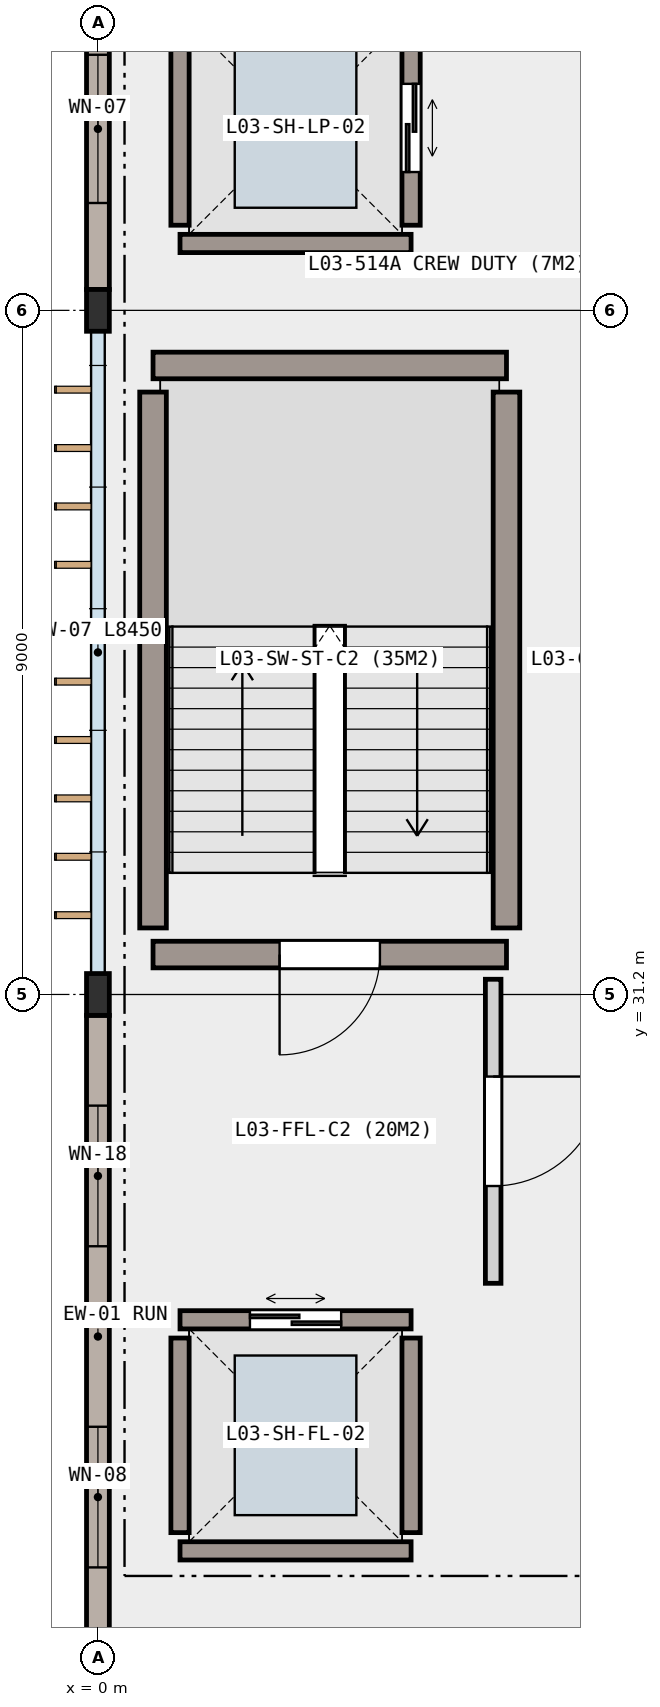
"""IFC4 building model, lengths in metres.
Left out: names, types, materials, properties, quantities, classifications, styles, units other than length and angle.
Written with IfcOpenShell. Run it as: python <this file> out.ifc"""

import sys

from ifc_helpers import new_model, si_unit, direction, frame, frame_2d, origin, origin_2d, place, context, subcontext, project, spatial, rectangle, i_section, extrude, element, fill, save


model = new_model("IFC4")
c1 = context("Model", 3, precision=1e-05, world=origin(), true_north=direction((0.0, 1.0)))
c2 = subcontext(c1, "Body", "Model", "MODEL_VIEW")
j1 = project(units=[si_unit("LENGTHUNIT", "METRE"), si_unit("PLANEANGLEUNIT", "RADIAN")], contexts=[c1])
p1 = place(None, origin())
s1 = spatial("IfcSite", under=j1, at=p1, CompositionType="ELEMENT")
p2 = place(p1, origin())
s2 = spatial("IfcBuilding", under=s1, at=p2, CompositionType="ELEMENT")
p3 = place(p2, frame((0.0, 0.0, 14.4)))
s3 = spatial("IfcBuildingStorey", under=s2, at=p3, CompositionType="ELEMENT", Elevation=14.4)
for number, where, z_axis, x_axis in (
    (1, (0.0, 31.2, 0.0), (0.0, 0.0, 1.0), (1.0, 0.0, 0.0)),
    (2, (0.0, 40.2, 0.0), (0.0, 0.0, 1.0), (1.0, 0.0, 0.0)),
):
    element("IfcColumn", number, at=place(p3, frame(where, z_axis=z_axis, x_axis=x_axis)), inside=s3, PredefinedType="COLUMN", context=c2, shape_type="SweptSolid", body=[
        extrude(i_section(OverallWidth=0.3, OverallDepth=0.55, WebThickness=0.015, FlangeThickness=0.029, FilletRadius=0.027, at=origin_2d()), origin(), (0.0, 0.0, 1.0), 4.2),
    ])
p4 = place(p3, frame((0.0, 22.475, 0.0), z_axis=(0.0, 0.0, 1.0), x_axis=(0.0, 1.0, 0.0)))
e3 = element("IfcWall", 3, at=p4, inside=s3, PredefinedType="SOLIDWALL", context=c2, shape_type="SweptSolid", body=[
    extrude(rectangle(XDim=8.45, YDim=0.3, at=frame_2d((4.225, 0.0))), origin(), (0.0, 0.0, 1.0), 3.53),
])
p5 = place(p4, frame((1.188, 0.0, 0.85)))
e4 = element("IfcOpeningElement", 4, at=p5, cuts=e3, PredefinedType="OPENING", context=c2, shape_type="SweptSolid", body=[
    extrude(rectangle(XDim=1.85, YDim=1.85, at=frame_2d((0.925, 0.925))), frame((0.0, 0.16, 0.0), z_axis=(0.0, -1.0, 0.0), x_axis=(1.0, 0.0, 0.0)), (0.0, 0.0, 1.0), 0.32),
])
p6 = place(p4, frame((5.413, 0.0, 0.85)))
e5 = element("IfcOpeningElement", 5, at=p6, cuts=e3, PredefinedType="OPENING", context=c2, shape_type="SweptSolid", body=[
    extrude(rectangle(XDim=1.85, YDim=2.15, at=frame_2d((0.925, 1.075))), frame((0.0, 0.16, 0.0), z_axis=(0.0, -1.0, 0.0), x_axis=(1.0, 0.0, 0.0)), (0.0, 0.0, 1.0), 0.32),
])
p7 = place(p3, frame((0.0, 40.475, 0.0), z_axis=(0.0, 0.0, 1.0), x_axis=(0.0, 1.0, 0.0)))
e6 = element("IfcWall", 6, at=p7, inside=s3, PredefinedType="SOLIDWALL", context=c2, shape_type="SweptSolid", body=[
    extrude(rectangle(XDim=8.45, YDim=0.3, at=frame_2d((4.225, 0.0))), origin(), (0.0, 0.0, 1.0), 3.53),
])
p8 = place(p7, frame((1.137, 0.0, 0.85)))
e7 = element("IfcOpeningElement", 7, at=p8, cuts=e6, PredefinedType="OPENING", context=c2, shape_type="SweptSolid", body=[
    extrude(rectangle(XDim=1.95, YDim=1.5, at=frame_2d((0.975, 0.75))), frame((0.0, 0.16, 0.0), z_axis=(0.0, -1.0, 0.0), x_axis=(1.0, 0.0, 0.0)), (0.0, 0.0, 1.0), 0.32),
])
p9 = place(p7, frame((5.363, 0.0, 0.85)))
e8 = element("IfcOpeningElement", 8, at=p9, cuts=e6, PredefinedType="OPENING", context=c2, shape_type="SweptSolid", body=[
    extrude(rectangle(XDim=1.95, YDim=1.85, at=frame_2d((0.975, 0.925))), frame((0.0, 0.16, 0.0), z_axis=(0.0, -1.0, 0.0), x_axis=(1.0, 0.0, 0.0)), (0.0, 0.0, 1.0), 0.32),
])
p10 = place(p3, frame((4.12, 23.88, 0.0), z_axis=(0.0, 0.0, 1.0), x_axis=(-1.0, 0.0, 0.0)))
e9 = element("IfcWall", 9, at=p10, inside=s3, PredefinedType="SHEAR", context=c2, shape_type="SweptSolid", body=[
    extrude(rectangle(XDim=3.04, YDim=0.24, at=frame_2d((1.52, 0.0))), origin(), (0.0, 0.0, 1.0), 3.96),
])
p11 = place(p3, frame((1.08, 26.92, 0.0), z_axis=(0.0, 0.0, 1.0), x_axis=(1.0, 0.0, 0.0)))
e10 = element("IfcWall", 10, at=p11, inside=s3, PredefinedType="SHEAR", context=c2, shape_type="SweptSolid", body=[
    extrude(rectangle(XDim=3.04, YDim=0.24, at=frame_2d((1.52, 0.0))), origin(), (0.0, 0.0, 1.0), 3.96),
])
p12 = place(p11, frame((0.92, 0.0, 0.0)))
e11 = element("IfcOpeningElement", 11, at=p12, cuts=e10, PredefinedType="OPENING", context=c2, shape_type="SweptSolid", body=[
    extrude(rectangle(XDim=1.2, YDim=2.15, at=frame_2d((0.6, 1.075))), frame((0.0, 0.13, 0.0), z_axis=(0.0, -1.0, 0.0), x_axis=(1.0, 0.0, 0.0)), (0.0, 0.0, 1.0), 0.26),
])
for number, where, z_axis, x_axis in (
    (12, (1.08, 24.12, 0.0), (0.0, 0.0, 1.0), (0.0, 1.0, 0.0)),
    (13, (4.12, 26.68, 0.0), (0.0, 0.0, 1.0), (0.0, -1.0, 0.0)),
):
    element("IfcWall", number, at=place(p3, frame(where, z_axis=z_axis, x_axis=x_axis)), inside=s3, PredefinedType="SHEAR", context=c2, shape_type="SweptSolid", body=[
        extrude(rectangle(XDim=2.56, YDim=0.24, at=frame_2d((1.28, 0.0))), origin(), (0.0, 0.0, 1.0), 3.96),
    ])
p13 = place(p3, frame((4.12, 41.08, 0.0), z_axis=(0.0, 0.0, 1.0), x_axis=(-1.0, 0.0, 0.0)))
e14 = element("IfcWall", 14, at=p13, inside=s3, PredefinedType="SHEAR", context=c2, shape_type="SweptSolid", body=[
    extrude(rectangle(XDim=3.04, YDim=0.24, at=frame_2d((1.52, 0.0))), origin(), (0.0, 0.0, 1.0), 3.96),
])
p14 = place(p3, frame((1.08, 41.32, 0.0), z_axis=(0.0, 0.0, 1.0), x_axis=(0.0, 1.0, 0.0)))
e15 = element("IfcWall", 15, at=p14, inside=s3, PredefinedType="SHEAR", context=c2, shape_type="SweptSolid", body=[
    extrude(rectangle(XDim=2.56, YDim=0.24, at=frame_2d((1.28, 0.0))), origin(), (0.0, 0.0, 1.0), 3.96),
])
p15 = place(p3, frame((4.12, 43.88, 0.0), z_axis=(0.0, 0.0, 1.0), x_axis=(0.0, -1.0, 0.0)))
e16 = element("IfcWall", 16, at=p15, inside=s3, PredefinedType="SHEAR", context=c2, shape_type="SweptSolid", body=[
    extrude(rectangle(XDim=2.56, YDim=0.24, at=frame_2d((1.28, 0.0))), origin(), (0.0, 0.0, 1.0), 3.96),
])
p16 = place(p15, frame((0.7, 0.0, 0.0)))
e17 = element("IfcOpeningElement", 17, at=p16, cuts=e16, PredefinedType="OPENING", context=c2, shape_type="SweptSolid", body=[
    extrude(rectangle(XDim=1.16, YDim=2.15, at=frame_2d((0.58, 1.075))), frame((0.0, 0.13, 0.0), z_axis=(0.0, -1.0, 0.0), x_axis=(1.0, 0.0, 0.0)), (0.0, 0.0, 1.0), 0.26),
])
p17 = place(p3, frame((5.375, 31.725, 0.0), z_axis=(0.0, 0.0, 1.0), x_axis=(-1.0, 0.0, 0.0)))
e18 = element("IfcWall", 18, at=p17, inside=s3, PredefinedType="SHEAR", context=c2, shape_type="SweptSolid", body=[
    extrude(rectangle(XDim=4.65, YDim=0.35, at=frame_2d((2.325, 0.0))), origin(), (0.0, 0.0, 1.0), 3.96),
])
p18 = place(p17, frame((1.665, 0.0, 0.0)))
e19 = element("IfcOpeningElement", 19, at=p18, cuts=e18, PredefinedType="OPENING", context=c2, shape_type="SweptSolid", body=[
    extrude(rectangle(XDim=1.32, YDim=2.15, at=frame_2d((0.66, 1.075))), frame((0.0, 0.185, 0.0), z_axis=(0.0, -1.0, 0.0), x_axis=(1.0, 0.0, 0.0)), (0.0, 0.0, 1.0), 0.37),
])
p19 = place(p3, frame((0.725, 39.475, 0.0), z_axis=(0.0, 0.0, 1.0), x_axis=(1.0, 0.0, 0.0)))
e20 = element("IfcWall", 20, at=p19, inside=s3, PredefinedType="SHEAR", context=c2, shape_type="SweptSolid", body=[
    extrude(rectangle(XDim=4.65, YDim=0.35, at=frame_2d((2.325, 0.0))), origin(), (0.0, 0.0, 1.0), 3.96),
])
for number, where, z_axis, x_axis in (
    (21, (0.725, 32.075, 0.0), (0.0, 0.0, 1.0), (0.0, 1.0, 0.0)),
    (22, (5.375, 39.125, 0.0), (0.0, 0.0, 1.0), (0.0, -1.0, 0.0)),
):
    element("IfcWall", number, at=place(p3, frame(where, z_axis=z_axis, x_axis=x_axis)), inside=s3, PredefinedType="SHEAR", context=c2, shape_type="SweptSolid", body=[
        extrude(rectangle(XDim=7.05, YDim=0.35, at=frame_2d((3.525, 0.0))), origin(), (0.0, 0.0, 1.0), 3.96),
    ])
p20 = place(p3, frame((5.2, 31.4, 0.0), z_axis=(0.0, 0.0, 1.0), x_axis=(0.0, -1.0, 0.0)))
e23 = element("IfcWall", 23, at=p20, inside=s3, PredefinedType="PARTITIONING", context=c2, shape_type="SweptSolid", body=[
    extrude(rectangle(XDim=4.0, YDim=0.205, at=frame_2d((2.0, 0.0))), origin(), (0.0, 0.0, 1.0), 3.96),
])
p21 = place(p20, frame((1.28, 0.0, 0.0)))
e24 = element("IfcOpeningElement", 24, at=p21, cuts=e23, PredefinedType="OPENING", context=c2, shape_type="SweptSolid", body=[
    extrude(rectangle(XDim=1.44, YDim=2.18, at=frame_2d((0.72, 1.09))), frame((0.0, 0.113, 0.0), z_axis=(0.0, -1.0, 0.0), x_axis=(1.0, 0.0, 0.0)), (0.0, 0.0, 1.0), 0.225),
])
p22 = place(p5, origin())
e25 = element("IfcWindow", 25, at=p22, inside=s3, PartitioningType="SINGLE_PANEL", PredefinedType="WINDOW", context=c2, shape_type="SweptSolid", body=[
    extrude(rectangle(XDim=1.85, YDim=1.85, at=frame_2d((0.925, 0.925))), frame((0.0, 0.03, 0.0), z_axis=(0.0, -1.0, 0.0), x_axis=(1.0, 0.0, 0.0)), (0.0, 0.0, 1.0), 0.06),
])
fill(e4, e25)
p23 = place(p6, origin())
e26 = element("IfcWindow", 26, at=p23, inside=s3, PartitioningType="SINGLE_PANEL", PredefinedType="WINDOW", context=c2, shape_type="SweptSolid", body=[
    extrude(rectangle(XDim=1.85, YDim=2.15, at=frame_2d((0.925, 1.075))), frame((0.0, 0.03, 0.0), z_axis=(0.0, -1.0, 0.0), x_axis=(1.0, 0.0, 0.0)), (0.0, 0.0, 1.0), 0.06),
])
fill(e5, e26)
p24 = place(p8, origin())
e27 = element("IfcWindow", 27, at=p24, inside=s3, PartitioningType="SINGLE_PANEL", PredefinedType="WINDOW", context=c2, shape_type="SweptSolid", body=[
    extrude(rectangle(XDim=1.95, YDim=1.5, at=frame_2d((0.975, 0.75))), frame((0.0, 0.03, 0.0), z_axis=(0.0, -1.0, 0.0), x_axis=(1.0, 0.0, 0.0)), (0.0, 0.0, 1.0), 0.06),
])
fill(e7, e27)
p25 = place(p12, origin())
e28 = element("IfcDoor", 28, at=p25, inside=s3, OperationType="DOUBLE_DOOR_SLIDING", PredefinedType="DOOR", context=c2, shape_type="SweptSolid", body=[
    extrude(rectangle(XDim=1.2, YDim=2.15, at=frame_2d((0.6, 1.075))), frame((0.0, 0.025, 0.0), z_axis=(0.0, -1.0, 0.0), x_axis=(1.0, 0.0, 0.0)), (0.0, 0.0, 1.0), 0.05),
])
fill(e11, e28)
p26 = place(p16, origin())
e29 = element("IfcDoor", 29, at=p26, inside=s3, OperationType="DOUBLE_DOOR_SLIDING", PredefinedType="DOOR", context=c2, shape_type="SweptSolid", body=[
    extrude(rectangle(XDim=1.16, YDim=2.15, at=frame_2d((0.58, 1.075))), frame((0.0, 0.025, 0.0), z_axis=(0.0, -1.0, 0.0), x_axis=(1.0, 0.0, 0.0)), (0.0, 0.0, 1.0), 0.05),
])
fill(e17, e29)
p27 = place(p18, origin())
e30 = element("IfcDoor", 30, at=p27, inside=s3, OperationType="SINGLE_SWING_RIGHT", PredefinedType="DOOR", context=c2, shape_type="SweptSolid", body=[
    extrude(rectangle(XDim=1.32, YDim=2.15, at=frame_2d((0.66, 1.075))), frame((0.0, 0.025, 0.0), z_axis=(0.0, -1.0, 0.0), x_axis=(1.0, 0.0, 0.0)), (0.0, 0.0, 1.0), 0.05),
])
fill(e19, e30)
p28 = place(p21, origin())
e31 = element("IfcDoor", 31, at=p28, inside=s3, OperationType="SINGLE_SWING_LEFT", PredefinedType="DOOR", context=c2, shape_type="SweptSolid", body=[
    extrude(rectangle(XDim=1.44, YDim=2.18, at=frame_2d((0.72, 1.09))), frame((0.0, 0.025, 0.0), z_axis=(0.0, -1.0, 0.0), x_axis=(1.0, 0.0, 0.0)), (0.0, 0.0, 1.0), 0.05),
])
fill(e24, e31)
save(model, sys.argv[1])
